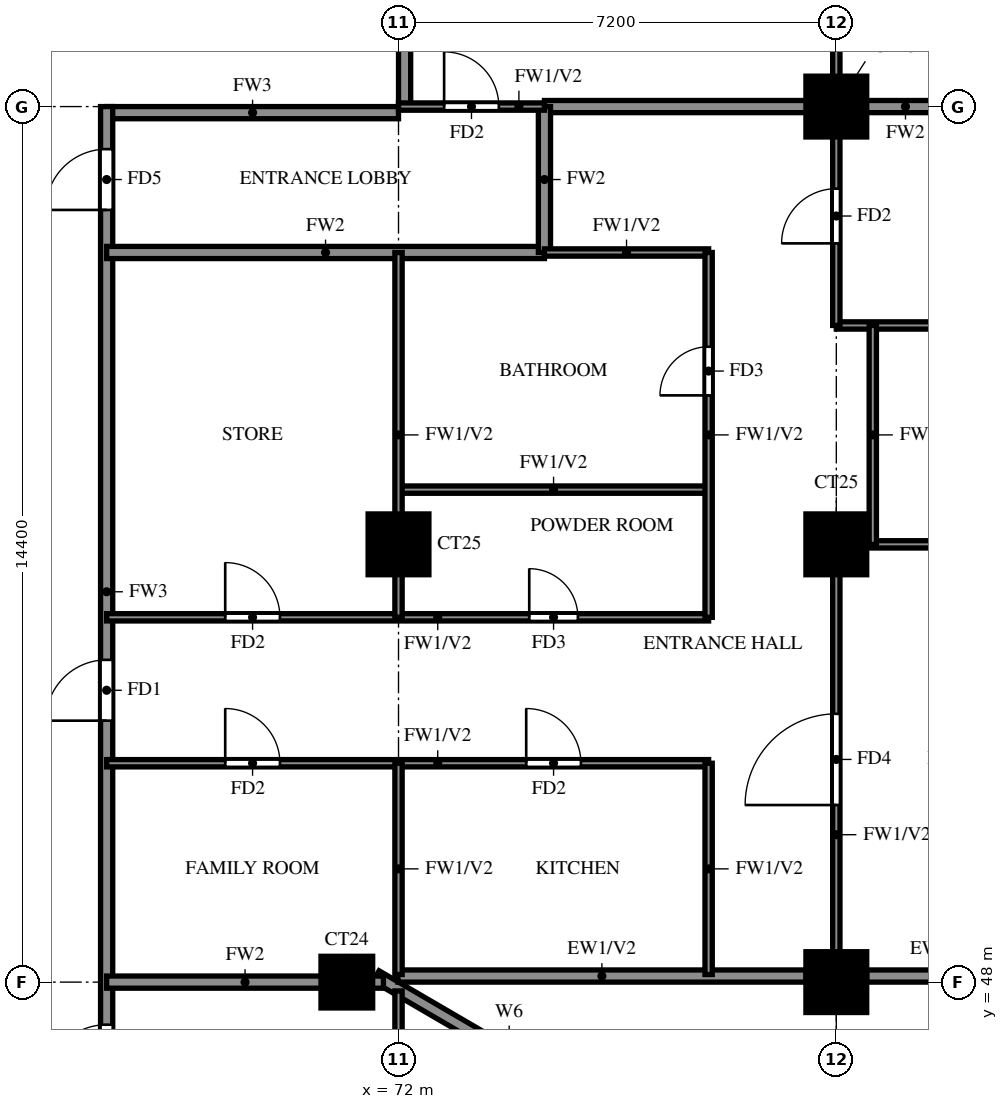
"""IFC4 building model, lengths in metres.
Left out: names, types, materials, properties, quantities, classifications, styles, units other than length and angle.
Written with IfcOpenShell. Run it as: python <this file> out.ifc"""

import sys

from ifc_helpers import new_model, si_unit, direction, frame, frame_2d, origin, origin_2d, place, context, subcontext, project, spatial, rectangle, extrude, source, transform, mapped, element, fill, save


model = new_model("IFC4")
c1 = context("Model", 3, precision=1e-05, world=origin(), true_north=direction((0.0, 1.0)))
c2 = subcontext(c1, "Body", "Model", "MODEL_VIEW")
j1 = project(units=[si_unit("LENGTHUNIT", "METRE"), si_unit("PLANEANGLEUNIT", "RADIAN")], contexts=[c1])
p1 = place(None, origin())
s1 = spatial("IfcSite", under=j1, at=p1, CompositionType="ELEMENT")
p2 = place(p1, origin())
s2 = spatial("IfcBuilding", under=s1, at=p2, CompositionType="ELEMENT")
p3 = place(p2, frame((0.0, 0.0, 171.0)))
s3 = spatial("IfcBuildingStorey", under=s2, at=p3, CompositionType="ELEMENT", Elevation=171.0)
m1 = source(origin(), c2, "Body", "SweptSolid", [
    extrude(rectangle(XDim=0.85, YDim=0.85, at=origin_2d()), origin(), (0.0, 0.0, 1.0), 3.2),
])
p4 = place(p3, frame((71.15, 48.0, 0.0), z_axis=(0.0, 0.0, 1.0), x_axis=(1.0, 0.0, 0.0)))
e1 = element("IfcColumn", 1, at=p4, inside=s3, PredefinedType="COLUMN", context=c2, shape_type="MappedRepresentation", body=[
    mapped(m1, transform((0.0, 0.0, 0.0))),
])
m2 = source(origin(), c2, "Body", "SweptSolid", [
    extrude(rectangle(XDim=1.0, YDim=1.0, at=origin_2d()), origin(), (0.0, 0.0, 1.0), 3.2),
])
for number, where, z_axis, x_axis in (
    (2, (79.2, 48.0, 0.0), (0.0, 0.0, 1.0), (1.0, 0.0, 0.0)),
    (3, (72.0, 55.2, 0.0), (0.0, 0.0, 1.0), (1.0, 0.0, 0.0)),
    (4, (79.2, 55.2, 0.0), (0.0, 0.0, 1.0), (1.0, 0.0, 0.0)),
    (5, (79.2, 62.4, 0.0), (0.0, 0.0, 1.0), (1.0, 0.0, 0.0)),
):
    element("IfcColumn", number, at=place(p3, frame(where, z_axis=z_axis, x_axis=x_axis)), inside=s3, PredefinedType="COLUMN", context=c2, shape_type="MappedRepresentation", body=[
        mapped(m2, transform((0.0, 0.0, 0.0))),
    ])
p5 = place(p3, frame((85.719, 39.881, 0.0), z_axis=(0.0, 0.0, 1.0), x_axis=(-0.86377618652, 0.503875678716, 0.0)))
e6 = element("IfcWall", 6, at=p5, inside=s3, PredefinedType="SOLIDWALL", context=c2, shape_type="SweptSolid", body=[
    extrude(rectangle(XDim=16.311, YDim=0.2, at=frame_2d((8.156, 0.0))), origin(), (0.0, 0.0, 1.0), 3.2),
])
p6 = place(p5, frame((13.326, 0.0, 1.5)))
e7 = element("IfcOpeningElement", 7, at=p6, cuts=e6, PredefinedType="OPENING", context=c2, shape_type="SweptSolid", body=[
    extrude(rectangle(XDim=0.9, YDim=0.9, at=frame_2d((0.45, 0.45))), frame((0.0, 0.11, 0.0), z_axis=(0.0, -1.0, 0.0), x_axis=(1.0, 0.0, 0.0)), (0.0, 0.0, 1.0), 0.22),
])
p7 = place(p3, frame((71.99, 48.1, 0.0), z_axis=(0.0, 0.0, 1.0), x_axis=(1.0, 0.0, 0.0)))
e8 = element("IfcWall", 8, at=p7, inside=s3, PredefinedType="SOLIDWALL", context=c2, shape_type="SweptSolid", body=[
    extrude(rectangle(XDim=6.71, YDim=0.2, at=frame_2d((3.355, 0.0))), origin(), (0.0, 0.0, 1.0), 3.2),
])
p8 = place(p3, frame((79.7, 48.1, 0.0), z_axis=(0.0, 0.0, 1.0), x_axis=(1.0, 0.0, 0.0)))
e9 = element("IfcWall", 9, at=p8, inside=s3, PredefinedType="SOLIDWALL", context=c2, shape_type="SweptSolid", body=[
    extrude(rectangle(XDim=5.675, YDim=0.2, at=frame_2d((2.837, 0.0))), origin(), (0.0, 0.0, 1.0), 3.2),
])
p9 = place(p8, frame((1.637, 0.0, 0.6)))
e10 = element("IfcOpeningElement", 10, at=p9, cuts=e9, PredefinedType="OPENING", context=c2, shape_type="SweptSolid", body=[
    extrude(rectangle(XDim=2.4, YDim=2.4, at=frame_2d((1.2, 1.2))), frame((0.0, 0.11, 0.0), z_axis=(0.0, -1.0, 0.0), x_axis=(1.0, 0.0, 0.0)), (0.0, 0.0, 1.0), 0.22),
])
p10 = place(p3, frame((67.2, 62.3, 0.0), z_axis=(0.0, 0.0, 1.0), x_axis=(1.0, 0.0, 0.0)))
e11 = element("IfcWall", 11, at=p10, inside=s3, PredefinedType="SOLIDWALL", context=c2, shape_type="SweptSolid", body=[
    extrude(rectangle(XDim=4.8, YDim=0.2, at=frame_2d((2.4, 0.0))), origin(), (0.0, 0.0, 1.0), 3.2),
])
p11 = place(p3, frame((67.2, 45.6, 0.0), z_axis=(0.0, 0.0, 1.0), x_axis=(0.0, 1.0, 0.0)))
e12 = element("IfcWall", 12, at=p11, inside=s3, PredefinedType="SOLIDWALL", context=c2, shape_type="SweptSolid", body=[
    extrude(rectangle(XDim=16.8, YDim=0.2, at=frame_2d((8.4, 0.0))), origin(), (0.0, 0.0, 1.0), 3.2),
])
p12 = place(p11, frame((6.7, 0.0, 0.0)))
e13 = element("IfcOpeningElement", 13, at=p12, cuts=e12, PredefinedType="OPENING", context=c2, shape_type="SweptSolid", body=[
    extrude(rectangle(XDim=1.0, YDim=2.1, at=frame_2d((0.5, 1.05))), frame((0.0, 0.11, 0.0), z_axis=(0.0, -1.0, 0.0), x_axis=(1.0, 0.0, 0.0)), (0.0, 0.0, 1.0), 0.22),
])
p13 = place(p11, frame((15.1, 0.0, 0.0)))
e14 = element("IfcOpeningElement", 14, at=p13, cuts=e12, PredefinedType="OPENING", context=c2, shape_type="SweptSolid", body=[
    extrude(rectangle(XDim=1.0, YDim=2.1, at=frame_2d((0.5, 1.05))), frame((0.0, 0.11, 0.0), z_axis=(0.0, -1.0, 0.0), x_axis=(1.0, 0.0, 0.0)), (0.0, 0.0, 1.0), 0.22),
])
p14 = place(p11, frame((0.7, 0.0, 0.0)))
e15 = element("IfcOpeningElement", 15, at=p14, cuts=e12, PredefinedType="OPENING", context=c2, shape_type="SweptSolid", body=[
    extrude(rectangle(XDim=1.0, YDim=2.1, at=frame_2d((0.5, 1.05))), frame((0.0, 0.11, 0.0), z_axis=(0.0, -1.0, 0.0), x_axis=(1.0, 0.0, 0.0)), (0.0, 0.0, 1.0), 0.22),
])
p15 = place(p3, frame((72.1, 62.4, 0.0), z_axis=(0.0, 0.0, 1.0), x_axis=(0.0, 1.0, 0.0)))
e16 = element("IfcWall", 16, at=p15, inside=s3, PredefinedType="SOLIDWALL", context=c2, shape_type="SweptSolid", body=[
    extrude(rectangle(XDim=15.6, YDim=0.2, at=frame_2d((7.8, 0.0))), origin(), (0.0, 0.0, 1.0), 3.2),
])
p16 = place(p3, frame((67.2, 48.0, 0.0), z_axis=(0.0, 0.0, 1.0), x_axis=(1.0, 0.0, 0.0)))
e17 = element("IfcWall", 17, at=p16, inside=s3, PredefinedType="SOLIDWALL", context=c2, shape_type="SweptSolid", body=[
    extrude(rectangle(XDim=4.552, YDim=0.2, at=frame_2d((2.276, 0.0))), origin(), (0.0, 0.0, 1.0), 3.2),
])
p17 = place(p3, frame((67.2, 60.0, 0.0), z_axis=(0.0, 0.0, 1.0), x_axis=(1.0, 0.0, 0.0)))
e18 = element("IfcWall", 18, at=p17, inside=s3, PredefinedType="SOLIDWALL", context=c2, shape_type="SweptSolid", body=[
    extrude(rectangle(XDim=7.2, YDim=0.2, at=frame_2d((3.6, 0.0))), origin(), (0.0, 0.0, 1.0), 3.2),
])
p18 = place(p3, frame((74.4, 62.4, 0.0), z_axis=(0.0, 0.0, 1.0), x_axis=(1.0, 0.0, 0.0)))
e19 = element("IfcWall", 19, at=p18, inside=s3, PredefinedType="SOLIDWALL", context=c2, shape_type="SweptSolid", body=[
    extrude(rectangle(XDim=11.875, YDim=0.2, at=frame_2d((5.938, 0.0))), origin(), (0.0, 0.0, 1.0), 3.2),
])
p19 = place(p3, frame((74.4, 60.0, 0.0), z_axis=(0.0, 0.0, 1.0), x_axis=(0.0, 1.0, 0.0)))
e20 = element("IfcWall", 20, at=p19, inside=s3, PredefinedType="SOLIDWALL", context=c2, shape_type="SweptSolid", body=[
    extrude(rectangle(XDim=2.4, YDim=0.2, at=frame_2d((1.2, 0.0))), origin(), (0.0, 0.0, 1.0), 3.2),
])
p20 = place(p3, frame((67.2, 51.6, 0.0), z_axis=(0.0, 0.0, 1.0), x_axis=(1.0, 0.0, 0.0)))
e21 = element("IfcWall", 21, at=p20, inside=s3, PredefinedType="PARTITIONING", context=c2, shape_type="SweptSolid", body=[
    extrude(rectangle(XDim=9.9, YDim=0.12, at=frame_2d((4.95, 0.0))), origin(), (0.0, 0.0, 1.0), 3.2),
])
p21 = place(p20, frame((6.9, 0.0, 0.0)))
e22 = element("IfcOpeningElement", 22, at=p21, cuts=e21, PredefinedType="OPENING", context=c2, shape_type="SweptSolid", body=[
    extrude(rectangle(XDim=0.9, YDim=2.1, at=frame_2d((0.45, 1.05))), frame((0.0, 0.07, 0.0), z_axis=(0.0, -1.0, 0.0), x_axis=(1.0, 0.0, 0.0)), (0.0, 0.0, 1.0), 0.14),
])
p22 = place(p20, frame((1.95, 0.0, 0.0)))
e23 = element("IfcOpeningElement", 23, at=p22, cuts=e21, PredefinedType="OPENING", context=c2, shape_type="SweptSolid", body=[
    extrude(rectangle(XDim=0.9, YDim=2.1, at=frame_2d((0.45, 1.05))), frame((0.0, 0.07, 0.0), z_axis=(0.0, -1.0, 0.0), x_axis=(1.0, 0.0, 0.0)), (0.0, 0.0, 1.0), 0.14),
])
p23 = place(p3, frame((67.2, 54.0, 0.0), z_axis=(0.0, 0.0, 1.0), x_axis=(1.0, 0.0, 0.0)))
e24 = element("IfcWall", 24, at=p23, inside=s3, PredefinedType="PARTITIONING", context=c2, shape_type="SweptSolid", body=[
    extrude(rectangle(XDim=9.9, YDim=0.12, at=frame_2d((4.95, 0.0))), origin(), (0.0, 0.0, 1.0), 3.2),
])
p24 = place(p23, frame((6.95, 0.0, 0.0)))
e25 = element("IfcOpeningElement", 25, at=p24, cuts=e24, PredefinedType="OPENING", context=c2, shape_type="SweptSolid", body=[
    extrude(rectangle(XDim=0.8, YDim=2.1, at=frame_2d((0.4, 1.05))), frame((0.0, 0.07, 0.0), z_axis=(0.0, -1.0, 0.0), x_axis=(1.0, 0.0, 0.0)), (0.0, 0.0, 1.0), 0.14),
])
p25 = place(p23, frame((1.95, 0.0, 0.0)))
e26 = element("IfcOpeningElement", 26, at=p25, cuts=e24, PredefinedType="OPENING", context=c2, shape_type="SweptSolid", body=[
    extrude(rectangle(XDim=0.9, YDim=2.1, at=frame_2d((0.45, 1.05))), frame((0.0, 0.07, 0.0), z_axis=(0.0, -1.0, 0.0), x_axis=(1.0, 0.0, 0.0)), (0.0, 0.0, 1.0), 0.14),
])
p26 = place(p3, frame((79.2, 55.2, 0.0), z_axis=(0.0, 0.0, 1.0), x_axis=(1.0, 0.0, 0.0)))
e27 = element("IfcWall", 27, at=p26, inside=s3, PredefinedType="PARTITIONING", context=c2, shape_type="SweptSolid", body=[
    extrude(rectangle(XDim=7.075, YDim=0.12, at=frame_2d((3.538, 0.0))), origin(), (0.0, 0.0, 1.0), 3.2),
])
p27 = place(p3, frame((72.0, 56.1, 0.0), z_axis=(0.0, 0.0, 1.0), x_axis=(1.0, 0.0, 0.0)))
e28 = element("IfcWall", 28, at=p27, inside=s3, PredefinedType="PARTITIONING", context=c2, shape_type="SweptSolid", body=[
    extrude(rectangle(XDim=5.1, YDim=0.12, at=frame_2d((2.55, 0.0))), origin(), (0.0, 0.0, 1.0), 3.2),
])
p28 = place(p3, frame((79.2, 58.8, 0.0), z_axis=(0.0, 0.0, 1.0), x_axis=(1.0, 0.0, 0.0)))
e29 = element("IfcWall", 29, at=p28, inside=s3, PredefinedType="PARTITIONING", context=c2, shape_type="SweptSolid", body=[
    extrude(rectangle(XDim=7.075, YDim=0.12, at=frame_2d((3.538, 0.0))), origin(), (0.0, 0.0, 1.0), 2.3),
])
p29 = place(p28, frame((3.438, 0.0, 0.0)))
e30 = element("IfcOpeningElement", 30, at=p29, cuts=e29, PredefinedType="OPENING", context=c2, shape_type="SweptSolid", body=[
    extrude(rectangle(XDim=0.8, YDim=2.1, at=frame_2d((0.4, 1.05))), frame((0.0, 0.07, 0.0), z_axis=(0.0, -1.0, 0.0), x_axis=(1.0, 0.0, 0.0)), (0.0, 0.0, 1.0), 0.14),
])
p30 = place(p3, frame((74.4, 60.0, 0.0), z_axis=(0.0, 0.0, 1.0), x_axis=(1.0, 0.0, 0.0)))
e31 = element("IfcWall", 31, at=p30, inside=s3, PredefinedType="PARTITIONING", context=c2, shape_type="SweptSolid", body=[
    extrude(rectangle(XDim=2.7, YDim=0.12, at=frame_2d((1.35, 0.0))), origin(), (0.0, 0.0, 1.0), 3.2),
])
p31 = place(p3, frame((72.0, 62.4, 0.0), z_axis=(0.0, 0.0, 1.0), x_axis=(1.0, 0.0, 0.0)))
e32 = element("IfcWall", 32, at=p31, inside=s3, PredefinedType="PARTITIONING", context=c2, shape_type="SweptSolid", body=[
    extrude(rectangle(XDim=2.4, YDim=0.12, at=frame_2d((1.2, 0.0))), origin(), (0.0, 0.0, 1.0), 3.2),
])
p32 = place(p31, frame((0.75, 0.0, 0.0)))
e33 = element("IfcOpeningElement", 33, at=p32, cuts=e32, PredefinedType="OPENING", context=c2, shape_type="SweptSolid", body=[
    extrude(rectangle(XDim=0.9, YDim=2.1, at=frame_2d((0.45, 1.05))), frame((0.0, 0.07, 0.0), z_axis=(0.0, -1.0, 0.0), x_axis=(1.0, 0.0, 0.0)), (0.0, 0.0, 1.0), 0.14),
])
p33 = place(p3, frame((72.0, 39.725, 0.0), z_axis=(0.0, 0.0, 1.0), x_axis=(0.0, 1.0, 0.0)))
e34 = element("IfcWall", 34, at=p33, inside=s3, PredefinedType="PARTITIONING", context=c2, shape_type="SweptSolid", body=[
    extrude(rectangle(XDim=8.13, YDim=0.12, at=frame_2d((4.065, 0.0))), origin(), (0.0, 0.0, 1.0), 2.3),
])
p34 = place(p33, frame((1.788, 0.0, 0.0)))
e35 = element("IfcOpeningElement", 35, at=p34, cuts=e34, PredefinedType="OPENING", context=c2, shape_type="SweptSolid", body=[
    extrude(rectangle(XDim=0.9, YDim=2.1, at=frame_2d((0.45, 1.05))), frame((0.0, 0.07, 0.0), z_axis=(0.0, -1.0, 0.0), x_axis=(1.0, 0.0, 0.0)), (0.0, 0.0, 1.0), 0.14),
])
p35 = place(p33, frame((4.575, 0.0, 0.0)))
e36 = element("IfcOpeningElement", 36, at=p35, cuts=e34, PredefinedType="OPENING", context=c2, shape_type="SweptSolid", body=[
    extrude(rectangle(XDim=0.8, YDim=2.1, at=frame_2d((0.4, 1.05))), frame((0.0, 0.07, 0.0), z_axis=(0.0, -1.0, 0.0), x_axis=(1.0, 0.0, 0.0)), (0.0, 0.0, 1.0), 0.14),
])
p36 = place(p3, frame((72.0, 48.125, 0.0), z_axis=(0.0, 0.0, 1.0), x_axis=(0.0, 1.0, 0.0)))
e37 = element("IfcWall", 37, at=p36, inside=s3, PredefinedType="PARTITIONING", context=c2, shape_type="SweptSolid", body=[
    extrude(rectangle(XDim=3.475, YDim=0.12, at=frame_2d((1.738, 0.0))), origin(), (0.0, 0.0, 1.0), 3.2),
])
p37 = place(p3, frame((72.0, 54.0, 0.0), z_axis=(0.0, 0.0, 1.0), x_axis=(0.0, 1.0, 0.0)))
e38 = element("IfcWall", 38, at=p37, inside=s3, PredefinedType="PARTITIONING", context=c2, shape_type="SweptSolid", body=[
    extrude(rectangle(XDim=6.0, YDim=0.12, at=frame_2d((3.0, 0.0))), origin(), (0.0, 0.0, 1.0), 3.2),
])
p38 = place(p3, frame((77.1, 48.125, 0.0), z_axis=(0.0, 0.0, 1.0), x_axis=(0.0, 1.0, 0.0)))
e39 = element("IfcWall", 39, at=p38, inside=s3, PredefinedType="PARTITIONING", context=c2, shape_type="SweptSolid", body=[
    extrude(rectangle(XDim=3.475, YDim=0.12, at=frame_2d((1.738, 0.0))), origin(), (0.0, 0.0, 1.0), 3.2),
])
p39 = place(p3, frame((77.1, 54.0, 0.0), z_axis=(0.0, 0.0, 1.0), x_axis=(0.0, 1.0, 0.0)))
e40 = element("IfcWall", 40, at=p39, inside=s3, PredefinedType="PARTITIONING", context=c2, shape_type="SweptSolid", body=[
    extrude(rectangle(XDim=6.0, YDim=0.12, at=frame_2d((3.0, 0.0))), origin(), (0.0, 0.0, 1.0), 3.2),
])
p40 = place(p39, frame((3.65, 0.0, 0.0)))
e41 = element("IfcOpeningElement", 41, at=p40, cuts=e40, PredefinedType="OPENING", context=c2, shape_type="SweptSolid", body=[
    extrude(rectangle(XDim=0.8, YDim=2.1, at=frame_2d((0.4, 1.05))), frame((0.0, 0.07, 0.0), z_axis=(0.0, -1.0, 0.0), x_axis=(1.0, 0.0, 0.0)), (0.0, 0.0, 1.0), 0.14),
])
p41 = place(p3, frame((79.2, 48.125, 0.0), z_axis=(0.0, 0.0, 1.0), x_axis=(0.0, 1.0, 0.0)))
e42 = element("IfcWall", 42, at=p41, inside=s3, PredefinedType="PARTITIONING", context=c2, shape_type="SweptSolid", body=[
    extrude(rectangle(XDim=7.075, YDim=0.12, at=frame_2d((3.538, 0.0))), origin(), (0.0, 0.0, 1.0), 3.2),
])
p42 = place(p41, frame((2.788, 0.0, 0.0)))
e43 = element("IfcOpeningElement", 43, at=p42, cuts=e42, PredefinedType="OPENING", context=c2, shape_type="SweptSolid", body=[
    extrude(rectangle(XDim=1.5, YDim=2.1, at=frame_2d((0.75, 1.05))), frame((0.0, 0.07, 0.0), z_axis=(0.0, -1.0, 0.0), x_axis=(1.0, 0.0, 0.0)), (0.0, 0.0, 1.0), 0.14),
])
p43 = place(p3, frame((79.2, 58.8, 0.0), z_axis=(0.0, 0.0, 1.0), x_axis=(0.0, 1.0, 0.0)))
e44 = element("IfcWall", 44, at=p43, inside=s3, PredefinedType="PARTITIONING", context=c2, shape_type="SweptSolid", body=[
    extrude(rectangle(XDim=10.8, YDim=0.12, at=frame_2d((5.4, 0.0))), origin(), (0.0, 0.0, 1.0), 3.2),
])
p44 = place(p43, frame((1.35, 0.0, 0.0)))
e45 = element("IfcOpeningElement", 45, at=p44, cuts=e44, PredefinedType="OPENING", context=c2, shape_type="SweptSolid", body=[
    extrude(rectangle(XDim=0.9, YDim=2.1, at=frame_2d((0.45, 1.05))), frame((0.0, 0.07, 0.0), z_axis=(0.0, -1.0, 0.0), x_axis=(1.0, 0.0, 0.0)), (0.0, 0.0, 1.0), 0.14),
])
p45 = place(p43, frame((4.95, 0.0, 0.0)))
e46 = element("IfcOpeningElement", 46, at=p45, cuts=e44, PredefinedType="OPENING", context=c2, shape_type="SweptSolid", body=[
    extrude(rectangle(XDim=0.9, YDim=2.1, at=frame_2d((0.45, 1.05))), frame((0.0, 0.07, 0.0), z_axis=(0.0, -1.0, 0.0), x_axis=(1.0, 0.0, 0.0)), (0.0, 0.0, 1.0), 0.14),
])
p46 = place(p43, frame((8.55, 0.0, 0.0)))
e47 = element("IfcOpeningElement", 47, at=p46, cuts=e44, PredefinedType="OPENING", context=c2, shape_type="SweptSolid", body=[
    extrude(rectangle(XDim=0.9, YDim=2.1, at=frame_2d((0.45, 1.05))), frame((0.0, 0.07, 0.0), z_axis=(0.0, -1.0, 0.0), x_axis=(1.0, 0.0, 0.0)), (0.0, 0.0, 1.0), 0.14),
])
p47 = place(p3, frame((79.8, 55.2, 0.0), z_axis=(0.0, 0.0, 1.0), x_axis=(0.0, 1.0, 0.0)))
e48 = element("IfcWall", 48, at=p47, inside=s3, PredefinedType="PARTITIONING", context=c2, shape_type="SweptSolid", body=[
    extrude(rectangle(XDim=3.6, YDim=0.12, at=frame_2d((1.8, 0.0))), origin(), (0.0, 0.0, 1.0), 3.2),
])
p48 = place(p12, origin())
e49 = element("IfcDoor", 49, at=p48, inside=s3, OperationType="SINGLE_SWING_RIGHT", PredefinedType="DOOR", context=c2, shape_type="SweptSolid", body=[
    extrude(rectangle(XDim=1.0, YDim=2.1, at=frame_2d((0.5, 1.05))), frame((0.0, 0.025, 0.0), z_axis=(0.0, -1.0, 0.0), x_axis=(1.0, 0.0, 0.0)), (0.0, 0.0, 1.0), 0.05),
])
fill(e13, e49)
p49 = place(p42, origin())
e50 = element("IfcDoor", 50, at=p49, inside=s3, OperationType="SINGLE_SWING_LEFT", PredefinedType="DOOR", context=c2, shape_type="SweptSolid", body=[
    extrude(rectangle(XDim=1.5, YDim=2.1, at=frame_2d((0.75, 1.05))), frame((0.0, 0.025, 0.0), z_axis=(0.0, -1.0, 0.0), x_axis=(1.0, 0.0, 0.0)), (0.0, 0.0, 1.0), 0.05),
])
fill(e43, e50)
p50 = place(p44, origin())
e51 = element("IfcDoor", 51, at=p50, inside=s3, OperationType="SINGLE_SWING_LEFT", PredefinedType="DOOR", context=c2, shape_type="SweptSolid", body=[
    extrude(rectangle(XDim=0.9, YDim=2.1, at=frame_2d((0.45, 1.05))), frame((0.0, 0.025, 0.0), z_axis=(0.0, -1.0, 0.0), x_axis=(1.0, 0.0, 0.0)), (0.0, 0.0, 1.0), 0.05),
])
fill(e45, e51)
p51 = place(p21, origin())
e52 = element("IfcDoor", 52, at=p51, inside=s3, OperationType="SINGLE_SWING_LEFT", PredefinedType="DOOR", context=c2, shape_type="SweptSolid", body=[
    extrude(rectangle(XDim=0.9, YDim=2.1, at=frame_2d((0.45, 1.05))), frame((0.0, 0.025, 0.0), z_axis=(0.0, -1.0, 0.0), x_axis=(1.0, 0.0, 0.0)), (0.0, 0.0, 1.0), 0.05),
])
fill(e22, e52)
p52 = place(p24, origin())
e53 = element("IfcDoor", 53, at=p52, inside=s3, OperationType="SINGLE_SWING_LEFT", PredefinedType="DOOR", context=c2, shape_type="SweptSolid", body=[
    extrude(rectangle(XDim=0.8, YDim=2.1, at=frame_2d((0.4, 1.05))), frame((0.0, 0.025, 0.0), z_axis=(0.0, -1.0, 0.0), x_axis=(1.0, 0.0, 0.0)), (0.0, 0.0, 1.0), 0.05),
])
fill(e25, e53)
p53 = place(p40, origin())
e54 = element("IfcDoor", 54, at=p53, inside=s3, OperationType="SINGLE_SWING_RIGHT", PredefinedType="DOOR", context=c2, shape_type="SweptSolid", body=[
    extrude(rectangle(XDim=0.8, YDim=2.1, at=frame_2d((0.4, 1.05))), frame((0.0, 0.025, 0.0), z_axis=(0.0, -1.0, 0.0), x_axis=(1.0, 0.0, 0.0)), (0.0, 0.0, 1.0), 0.05),
])
fill(e41, e54)
p54 = place(p22, origin())
e55 = element("IfcDoor", 55, at=p54, inside=s3, OperationType="SINGLE_SWING_LEFT", PredefinedType="DOOR", context=c2, shape_type="SweptSolid", body=[
    extrude(rectangle(XDim=0.9, YDim=2.1, at=frame_2d((0.45, 1.05))), frame((0.0, 0.025, 0.0), z_axis=(0.0, -1.0, 0.0), x_axis=(1.0, 0.0, 0.0)), (0.0, 0.0, 1.0), 0.05),
])
fill(e23, e55)
p55 = place(p25, origin())
e56 = element("IfcDoor", 56, at=p55, inside=s3, OperationType="SINGLE_SWING_LEFT", PredefinedType="DOOR", context=c2, shape_type="SweptSolid", body=[
    extrude(rectangle(XDim=0.9, YDim=2.1, at=frame_2d((0.45, 1.05))), frame((0.0, 0.025, 0.0), z_axis=(0.0, -1.0, 0.0), x_axis=(1.0, 0.0, 0.0)), (0.0, 0.0, 1.0), 0.05),
])
fill(e26, e56)
p56 = place(p32, origin())
e57 = element("IfcDoor", 57, at=p56, inside=s3, OperationType="SINGLE_SWING_LEFT", PredefinedType="DOOR", context=c2, shape_type="SweptSolid", body=[
    extrude(rectangle(XDim=0.9, YDim=2.1, at=frame_2d((0.45, 1.05))), frame((0.0, 0.025, 0.0), z_axis=(0.0, -1.0, 0.0), x_axis=(1.0, 0.0, 0.0)), (0.0, 0.0, 1.0), 0.05),
])
fill(e33, e57)
p57 = place(p13, origin())
e58 = element("IfcDoor", 58, at=p57, inside=s3, OperationType="SINGLE_SWING_RIGHT", PredefinedType="DOOR", context=c2, shape_type="SweptSolid", body=[
    extrude(rectangle(XDim=1.0, YDim=2.1, at=frame_2d((0.5, 1.05))), frame((0.0, 0.025, 0.0), z_axis=(0.0, -1.0, 0.0), x_axis=(1.0, 0.0, 0.0)), (0.0, 0.0, 1.0), 0.05),
])
fill(e14, e58)
p58 = place(p14, origin())
e59 = element("IfcDoor", 59, at=p58, inside=s3, OperationType="SINGLE_SWING_RIGHT", PredefinedType="DOOR", context=c2, shape_type="SweptSolid", body=[
    extrude(rectangle(XDim=1.0, YDim=2.1, at=frame_2d((0.5, 1.05))), frame((0.0, 0.025, 0.0), z_axis=(0.0, -1.0, 0.0), x_axis=(1.0, 0.0, 0.0)), (0.0, 0.0, 1.0), 0.05),
])
fill(e15, e59)
save(model, sys.argv[1])
